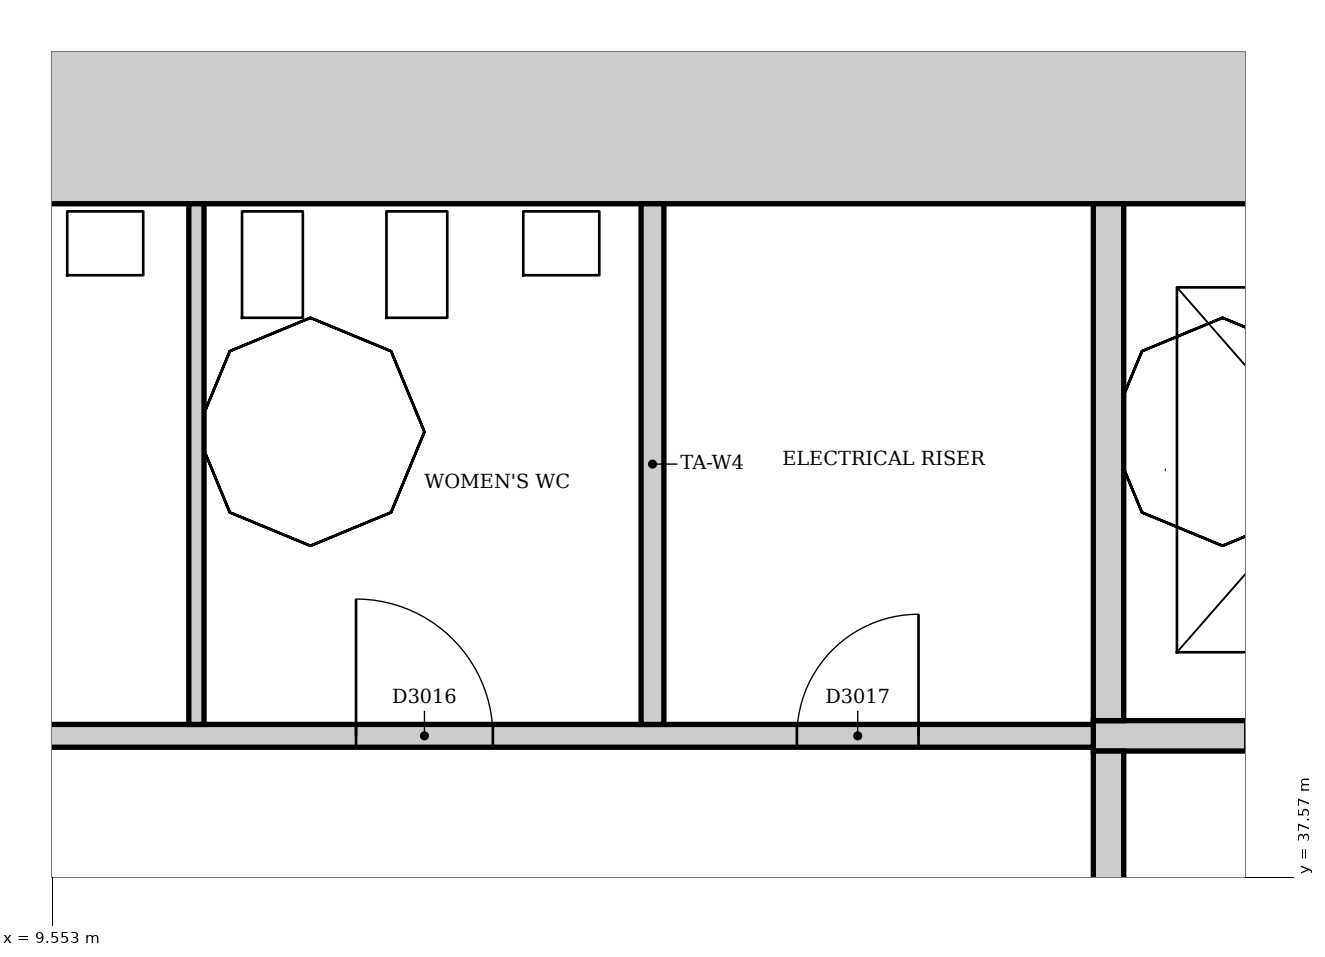
"""IFC4 building model, lengths in metres.
Left out: names, types, materials, properties, quantities, classifications, styles, units other than length and angle.
Written with IfcOpenShell. Run it as: python <this file> out.ifc"""

import sys

from ifc_helpers import new_model, si_unit, direction, frame, frame_2d, origin, place, context, subcontext, project, spatial, rectangle, extrude, element, fill, save


model = new_model("IFC4")
c1 = context("Model", 3, precision=1e-05, world=origin(), true_north=direction((0.0, 1.0)))
c2 = subcontext(c1, "Body", "Model", "MODEL_VIEW")
j1 = project(units=[si_unit("LENGTHUNIT", "METRE"), si_unit("PLANEANGLEUNIT", "RADIAN")], contexts=[c1])
p1 = place(None, origin())
s1 = spatial("IfcSite", under=j1, at=p1, CompositionType="ELEMENT")
p2 = place(p1, origin())
s2 = spatial("IfcBuilding", under=s1, at=p2, CompositionType="ELEMENT")
p3 = place(p2, frame((0.0, 0.0, -14.0)))
s3 = spatial("IfcBuildingStorey", under=s2, at=p3, CompositionType="ELEMENT", Elevation=-14.0)
p4 = place(p3, frame((23.7, 42.6, 0.0), z_axis=(0.0, 0.0, 1.0), x_axis=(-1.0, 0.0, 0.0)))
e1 = element("IfcWall", 1, at=p4, inside=s3, PredefinedType="SOLIDWALL", context=c2, shape_type="SweptSolid", body=[
    extrude(rectangle(XDim=19.8, YDim=1.2, at=frame_2d((9.9, 0.0))), origin(), (0.0, 0.0, 1.0), 4.5),
])
p5 = place(p3, frame((16.4, 38.5, 0.0), z_axis=(0.0, 0.0, 1.0), x_axis=(1.0, 0.0, 0.0)))
e2 = element("IfcWall", 2, at=p5, inside=s3, PredefinedType="PARTITIONING", context=c2, shape_type="SweptSolid", body=[
    extrude(rectangle(XDim=6.1, YDim=0.2, at=frame_2d((3.05, 0.0))), origin(), (0.0, 0.0, 1.0), 4.15),
])
p6 = place(p5, frame((1.0, 0.0, 0.0)))
e3 = element("IfcOpeningElement", 3, at=p6, cuts=e2, PredefinedType="OPENING", context=c2, shape_type="SweptSolid", body=[
    extrude(rectangle(XDim=1.2, YDim=2.1, at=frame_2d((0.6, 1.05))), frame((0.0, 0.11, 0.0), z_axis=(0.0, -1.0, 0.0), x_axis=(1.0, 0.0, 0.0)), (0.0, 0.0, 1.0), 0.22),
])
p7 = place(p5, frame((4.0, 0.0, 0.0)))
e4 = element("IfcOpeningElement", 4, at=p7, cuts=e2, PredefinedType="OPENING", context=c2, shape_type="SweptSolid", body=[
    extrude(rectangle(XDim=1.2, YDim=2.1, at=frame_2d((0.6, 1.05))), frame((0.0, 0.11, 0.0), z_axis=(0.0, -1.0, 0.0), x_axis=(1.0, 0.0, 0.0)), (0.0, 0.0, 1.0), 0.22),
])
p8 = place(p3, frame((16.5, 35.85, 0.0), z_axis=(0.0, 0.0, 1.0), x_axis=(0.0, 1.0, 0.0)))
e5 = element("IfcWall", 5, at=p8, inside=s3, PredefinedType="PARTITIONING", context=c2, shape_type="SweptSolid", body=[
    extrude(rectangle(XDim=2.55, YDim=0.2, at=frame_2d((1.275, 0.0))), origin(), (0.0, 0.0, 1.0), 4.15),
])
p9 = place(p3, frame((16.5, 38.6, 0.0), z_axis=(0.0, 0.0, 1.0), x_axis=(0.0, 1.0, 0.0)))
e6 = element("IfcWall", 6, at=p9, inside=s3, PredefinedType="PARTITIONING", context=c2, shape_type="SweptSolid", body=[
    extrude(rectangle(XDim=3.4, YDim=0.2, at=frame_2d((1.7, 0.0))), origin(), (0.0, 0.0, 1.0), 4.15),
])
p10 = place(p3, frame((4.5, 38.5, 0.0), z_axis=(0.0, 0.0, 1.0), x_axis=(1.0, 0.0, 0.0)))
e7 = element("IfcWall", 7, at=p10, inside=s3, PredefinedType="PARTITIONING", context=c2, shape_type="SweptSolid", body=[
    extrude(rectangle(XDim=11.9, YDim=0.15, at=frame_2d((5.95, 0.0))), origin(), (0.0, 0.0, 1.0), 4.15),
])
p11 = place(p10, frame((1.1, 0.0, 0.0)))
e8 = element("IfcOpeningElement", 8, at=p11, cuts=e7, PredefinedType="OPENING", context=c2, shape_type="SweptSolid", body=[
    extrude(rectangle(XDim=0.9, YDim=2.1, at=frame_2d((0.45, 1.05))), frame((0.0, 0.085, 0.0), z_axis=(0.0, -1.0, 0.0), x_axis=(1.0, 0.0, 0.0)), (0.0, 0.0, 1.0), 0.17),
])
p12 = place(p10, frame((4.05, 0.0, 0.0)))
e9 = element("IfcOpeningElement", 9, at=p12, cuts=e7, PredefinedType="OPENING", context=c2, shape_type="SweptSolid", body=[
    extrude(rectangle(XDim=0.9, YDim=2.1, at=frame_2d((0.45, 1.05))), frame((0.0, 0.085, 0.0), z_axis=(0.0, -1.0, 0.0), x_axis=(1.0, 0.0, 0.0)), (0.0, 0.0, 1.0), 0.17),
])
p13 = place(p10, frame((7.05, 0.0, 0.0)))
e10 = element("IfcOpeningElement", 10, at=p13, cuts=e7, PredefinedType="OPENING", context=c2, shape_type="SweptSolid", body=[
    extrude(rectangle(XDim=0.9, YDim=2.1, at=frame_2d((0.45, 1.05))), frame((0.0, 0.085, 0.0), z_axis=(0.0, -1.0, 0.0), x_axis=(1.0, 0.0, 0.0)), (0.0, 0.0, 1.0), 0.17),
])
p14 = place(p10, frame((9.95, 0.0, 0.0)))
e11 = element("IfcOpeningElement", 11, at=p14, cuts=e7, PredefinedType="OPENING", context=c2, shape_type="SweptSolid", body=[
    extrude(rectangle(XDim=0.8, YDim=2.1, at=frame_2d((0.4, 1.05))), frame((0.0, 0.085, 0.0), z_axis=(0.0, -1.0, 0.0), x_axis=(1.0, 0.0, 0.0)), (0.0, 0.0, 1.0), 0.17),
])
p15 = place(p3, frame((13.5, 38.575, 0.0), z_axis=(0.0, 0.0, 1.0), x_axis=(0.0, 1.0, 0.0)))
e12 = element("IfcWall", 12, at=p15, inside=s3, PredefinedType="PARTITIONING", context=c2, shape_type="SweptSolid", body=[
    extrude(rectangle(XDim=3.425, YDim=0.15, at=frame_2d((1.712, 0.0))), origin(), (0.0, 0.0, 1.0), 4.15),
])
p16 = place(p3, frame((10.5, 38.575, 0.0), z_axis=(0.0, 0.0, 1.0), x_axis=(0.0, 1.0, 0.0)))
e13 = element("IfcWall", 13, at=p16, inside=s3, PredefinedType="PARTITIONING", context=c2, shape_type="SweptSolid", body=[
    extrude(rectangle(XDim=3.425, YDim=0.1, at=frame_2d((1.712, 0.0))), origin(), (0.0, 0.0, 1.0), 4.15),
])
p17 = place(p13, origin())
e14 = element("IfcDoor", 14, at=p17, inside=s3, OperationType="SINGLE_SWING_LEFT", PredefinedType="DOOR", context=c2, shape_type="SweptSolid", body=[
    extrude(rectangle(XDim=0.9, YDim=2.1, at=frame_2d((0.45, 1.05))), frame((0.0, 0.025, 0.0), z_axis=(0.0, -1.0, 0.0), x_axis=(1.0, 0.0, 0.0)), (0.0, 0.0, 1.0), 0.05),
])
fill(e10, e14)
p18 = place(p14, origin())
e15 = element("IfcDoor", 15, at=p18, inside=s3, OperationType="SINGLE_SWING_RIGHT", PredefinedType="DOOR", context=c2, shape_type="SweptSolid", body=[
    extrude(rectangle(XDim=0.8, YDim=2.1, at=frame_2d((0.4, 1.05))), frame((0.0, 0.025, 0.0), z_axis=(0.0, -1.0, 0.0), x_axis=(1.0, 0.0, 0.0)), (0.0, 0.0, 1.0), 0.05),
])
fill(e11, e15)
save(model, sys.argv[1])
